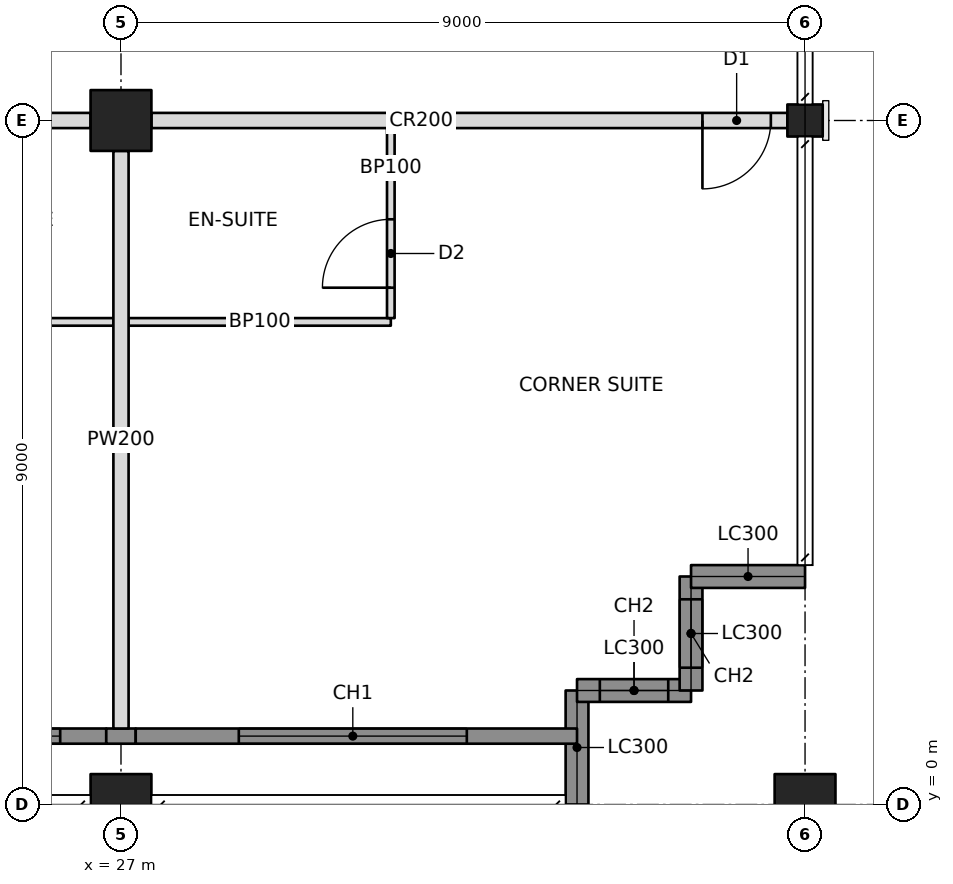
"""IFC4 building model, lengths in metres.
Left out: names, types, materials, properties, quantities, classifications, styles, units other than length and angle.
Written with IfcOpenShell. Run it as: python <this file> out.ifc"""

import sys

from ifc_helpers import new_model, si_unit, direction, frame, frame_2d, origin, origin_2d, place, context, subcontext, project, spatial, rectangle, hollow_rectangle, i_section, extrude, element, fill, save


model = new_model("IFC4")
c1 = context("Model", 3, precision=1e-05, world=origin(), true_north=direction((0.0, 1.0)))
c2 = subcontext(c1, "Body", "Model", "MODEL_VIEW")
j1 = project(units=[si_unit("LENGTHUNIT", "METRE"), si_unit("PLANEANGLEUNIT", "RADIAN")], contexts=[c1])
p1 = place(None, origin())
s1 = spatial("IfcSite", under=j1, at=p1, CompositionType="ELEMENT")
p2 = place(p1, origin())
s2 = spatial("IfcBuilding", under=s1, at=p2, CompositionType="ELEMENT")
p3 = place(p2, frame((0.0, 0.0, 244.6)))
s3 = spatial("IfcBuildingStorey", under=s2, at=p3, CompositionType="ELEMENT", Elevation=244.6)
p4 = place(p3, frame((27.0, 0.0, 0.0), z_axis=(0.0, 0.0, 1.0), x_axis=(1.0, 0.0, 0.0)))
e1 = element("IfcColumn", 1, at=p4, inside=s3, PredefinedType="COLUMN", context=c2, shape_type="SweptSolid", body=[
    extrude(hollow_rectangle(XDim=0.8, YDim=0.8, WallThickness=0.05, at=origin_2d()), origin(), (0.0, 0.0, 1.0), 3.6),
])
p5 = place(p3, frame((27.0, 9.0, 0.0), z_axis=(0.0, 0.0, 1.0), x_axis=(1.0, 0.0, 0.0)))
e2 = element("IfcColumn", 2, at=p5, inside=s3, PredefinedType="COLUMN", context=c2, shape_type="SweptSolid", body=[
    extrude(hollow_rectangle(XDim=0.8, YDim=0.8, WallThickness=0.04, at=origin_2d()), origin(), (0.0, 0.0, 1.0), 3.6),
])
p6 = place(p3, frame((36.0, 0.0, 0.0), z_axis=(0.0, 0.0, 1.0), x_axis=(1.0, 0.0, 0.0)))
e3 = element("IfcColumn", 3, at=p6, inside=s3, PredefinedType="COLUMN", context=c2, shape_type="SweptSolid", body=[
    extrude(hollow_rectangle(XDim=0.8, YDim=0.8, WallThickness=0.05, at=origin_2d()), origin(), (0.0, 0.0, 1.0), 3.6),
])
p7 = place(p3, frame((36.0, 9.0, 0.0), z_axis=(0.0, 0.0, 1.0), x_axis=(0.0, 1.0, 0.0)))
e4 = element("IfcColumn", 4, at=p7, inside=s3, PredefinedType="COLUMN", context=c2, shape_type="SweptSolid", body=[
    extrude(i_section(OverallWidth=0.422, OverallDepth=0.465, WebThickness=0.045, FlangeThickness=0.073, at=origin_2d()), origin(), (0.0, 0.0, 1.0), 3.6),
])
p8 = place(p3, frame((33.0, 0.0, 0.0), z_axis=(0.0, 0.0, 1.0), x_axis=(0.0, 1.0, 0.0)))
e5 = element("IfcWall", 5, at=p8, inside=s3, PredefinedType="SOLIDWALL", context=c2, shape_type="SweptSolid", body=[
    extrude(rectangle(XDim=1.5, YDim=0.3, at=frame_2d((0.75, 0.0))), origin(), (0.0, 0.0, 1.0), 2.62),
])
p9 = place(p3, frame((33.0, 1.5, 0.0), z_axis=(0.0, 0.0, 1.0), x_axis=(1.0, 0.0, 0.0)))
e6 = element("IfcWall", 6, at=p9, inside=s3, PredefinedType="SOLIDWALL", context=c2, shape_type="SweptSolid", body=[
    extrude(rectangle(XDim=1.5, YDim=0.3, at=frame_2d((0.75, 0.0))), origin(), (0.0, 0.0, 1.0), 3.4),
])
p10 = place(p9, frame((0.3, 0.0, 0.6)))
e7 = element("IfcOpeningElement", 7, at=p10, cuts=e6, PredefinedType="OPENING", context=c2, shape_type="SweptSolid", body=[
    extrude(rectangle(XDim=0.9, YDim=2.2, at=frame_2d((0.45, 1.1))), frame((0.0, 0.16, 0.0), z_axis=(0.0, -1.0, 0.0), x_axis=(1.0, 0.0, 0.0)), (0.0, 0.0, 1.0), 0.32),
])
p11 = place(p3, frame((34.5, 1.5, 0.0), z_axis=(0.0, 0.0, 1.0), x_axis=(0.0, 1.0, 0.0)))
e8 = element("IfcWall", 8, at=p11, inside=s3, PredefinedType="SOLIDWALL", context=c2, shape_type="SweptSolid", body=[
    extrude(rectangle(XDim=1.5, YDim=0.3, at=frame_2d((0.75, 0.0))), origin(), (0.0, 0.0, 1.0), 3.4),
])
p12 = place(p11, frame((0.3, 0.0, 0.6)))
e9 = element("IfcOpeningElement", 9, at=p12, cuts=e8, PredefinedType="OPENING", context=c2, shape_type="SweptSolid", body=[
    extrude(rectangle(XDim=0.9, YDim=2.2, at=frame_2d((0.45, 1.1))), frame((0.0, 0.16, 0.0), z_axis=(0.0, -1.0, 0.0), x_axis=(1.0, 0.0, 0.0)), (0.0, 0.0, 1.0), 0.32),
])
p13 = place(p3, frame((34.5, 3.0, 0.0), z_axis=(0.0, 0.0, 1.0), x_axis=(1.0, 0.0, 0.0)))
e10 = element("IfcWall", 10, at=p13, inside=s3, PredefinedType="SOLIDWALL", context=c2, shape_type="SweptSolid", body=[
    extrude(rectangle(XDim=1.5, YDim=0.3, at=frame_2d((0.75, 0.0))), origin(), (0.0, 0.0, 1.0), 2.62),
])
p14 = place(p3, frame((18.4, 9.0, 0.0), z_axis=(0.0, 0.0, 1.0), x_axis=(1.0, 0.0, 0.0)))
e11 = element("IfcWall", 11, at=p14, inside=s3, PredefinedType="PARTITIONING", context=c2, shape_type="SweptSolid", body=[
    extrude(rectangle(XDim=8.2, YDim=0.2, at=frame_2d((4.1, 0.0))), origin(), (0.0, 0.0, 1.0), 2.605),
])
p15 = place(p14, frame((0.15, 0.0, 0.0)))
e12 = element("IfcOpeningElement", 12, at=p15, cuts=e11, PredefinedType="OPENING", context=c2, shape_type="SweptSolid", body=[
    extrude(rectangle(XDim=0.9, YDim=2.1, at=frame_2d((0.45, 1.05))), frame((0.0, 0.11, 0.0), z_axis=(0.0, -1.0, 0.0), x_axis=(1.0, 0.0, 0.0)), (0.0, 0.0, 1.0), 0.22),
])
p16 = place(p3, frame((27.4, 9.0, 0.0), z_axis=(0.0, 0.0, 1.0), x_axis=(1.0, 0.0, 0.0)))
e13 = element("IfcWall", 13, at=p16, inside=s3, PredefinedType="PARTITIONING", context=c2, shape_type="SweptSolid", body=[
    extrude(rectangle(XDim=8.368, YDim=0.2, at=frame_2d((4.184, 0.0))), origin(), (0.0, 0.0, 1.0), 2.605),
])
p17 = place(p16, frame((7.25, 0.0, 0.0)))
e14 = element("IfcOpeningElement", 14, at=p17, cuts=e13, PredefinedType="OPENING", context=c2, shape_type="SweptSolid", body=[
    extrude(rectangle(XDim=0.9, YDim=2.1, at=frame_2d((0.45, 1.05))), frame((0.0, 0.11, 0.0), z_axis=(0.0, -1.0, 0.0), x_axis=(1.0, 0.0, 0.0)), (0.0, 0.0, 1.0), 0.22),
])
p18 = place(p3, frame((27.0, 8.6, 0.0), z_axis=(0.0, 0.0, 1.0), x_axis=(0.0, -1.0, 0.0)))
e15 = element("IfcWall", 15, at=p18, inside=s3, PredefinedType="PARTITIONING", context=c2, shape_type="SweptSolid", body=[
    extrude(rectangle(XDim=7.6, YDim=0.2, at=frame_2d((3.8, 0.0))), origin(), (0.0, 0.0, 1.0), 2.605),
])
for number, where, z_axis, x_axis in (
    (16, (23.45, 6.35, 0.0), (0.0, 0.0, 1.0), (1.0, 0.0, 0.0)),
    (17, (27.1, 6.35, 0.0), (0.0, 0.0, 1.0), (1.0, 0.0, 0.0)),
):
    element("IfcWall", number, at=place(p3, frame(where, z_axis=z_axis, x_axis=x_axis)), inside=s3, PredefinedType="PARTITIONING", context=c2, shape_type="SweptSolid", body=[
        extrude(rectangle(XDim=3.45, YDim=0.1, at=frame_2d((1.725, 0.0))), origin(), (0.0, 0.0, 1.0), 2.604),
    ])
p19 = place(p3, frame((30.55, 8.9, 0.0), z_axis=(0.0, 0.0, 1.0), x_axis=(0.0, -1.0, 0.0)))
e18 = element("IfcWall", 18, at=p19, inside=s3, PredefinedType="PARTITIONING", context=c2, shape_type="SweptSolid", body=[
    extrude(rectangle(XDim=2.5, YDim=0.1, at=frame_2d((1.25, 0.0))), origin(), (0.0, 0.0, 1.0), 2.604),
])
p20 = place(p19, frame((1.2, 0.0, 0.0)))
e19 = element("IfcOpeningElement", 19, at=p20, cuts=e18, PredefinedType="OPENING", context=c2, shape_type="SweptSolid", body=[
    extrude(rectangle(XDim=0.9, YDim=2.1, at=frame_2d((0.45, 1.05))), frame((0.0, 0.06, 0.0), z_axis=(0.0, -1.0, 0.0), x_axis=(1.0, 0.0, 0.0)), (0.0, 0.0, 1.0), 0.12),
])
p21 = place(p3, frame((18.194, 0.9, 0.0), z_axis=(0.0, 0.0, 1.0), x_axis=(1.0, 0.0, 0.0)))
e20 = element("IfcWall", 20, at=p21, inside=s3, PredefinedType="SOLIDWALL", context=c2, shape_type="SweptSolid", body=[
    extrude(rectangle(XDim=8.612, YDim=0.2, at=frame_2d((4.306, 0.0))), origin(), (0.0, 0.0, 1.0), 3.4),
])
p22 = place(p21, frame((0.606, 0.0, 0.6)))
e21 = element("IfcOpeningElement", 21, at=p22, cuts=e20, PredefinedType="OPENING", context=c2, shape_type="SweptSolid", body=[
    extrude(rectangle(XDim=3.0, YDim=2.2, at=frame_2d((1.5, 1.1))), frame((0.0, 0.11, 0.0), z_axis=(0.0, -1.0, 0.0), x_axis=(1.0, 0.0, 0.0)), (0.0, 0.0, 1.0), 0.22),
])
p23 = place(p21, frame((5.006, 0.0, 0.6)))
e22 = element("IfcOpeningElement", 22, at=p23, cuts=e20, PredefinedType="OPENING", context=c2, shape_type="SweptSolid", body=[
    extrude(rectangle(XDim=3.0, YDim=2.2, at=frame_2d((1.5, 1.1))), frame((0.0, 0.11, 0.0), z_axis=(0.0, -1.0, 0.0), x_axis=(1.0, 0.0, 0.0)), (0.0, 0.0, 1.0), 0.22),
])
p24 = place(p3, frame((26.806, 0.9, 0.0), z_axis=(0.0, 0.0, 1.0), x_axis=(1.0, 0.0, 0.0)))
e23 = element("IfcWall", 23, at=p24, inside=s3, PredefinedType="SOLIDWALL", context=c2, shape_type="SweptSolid", body=[
    extrude(rectangle(XDim=0.388, YDim=0.2, at=frame_2d((0.194, 0.0))), origin(), (0.0, 0.0, 1.0), 2.604),
])
p25 = place(p3, frame((27.194, 0.9, 0.0), z_axis=(0.0, 0.0, 1.0), x_axis=(1.0, 0.0, 0.0)))
e24 = element("IfcWall", 24, at=p25, inside=s3, PredefinedType="SOLIDWALL", context=c2, shape_type="SweptSolid", body=[
    extrude(rectangle(XDim=5.806, YDim=0.2, at=frame_2d((2.903, 0.0))), origin(), (0.0, 0.0, 1.0), 3.4),
])
p26 = place(p25, frame((1.356, 0.0, 0.6)))
e25 = element("IfcOpeningElement", 25, at=p26, cuts=e24, PredefinedType="OPENING", context=c2, shape_type="SweptSolid", body=[
    extrude(rectangle(XDim=3.0, YDim=2.2, at=frame_2d((1.5, 1.1))), frame((0.0, 0.11, 0.0), z_axis=(0.0, -1.0, 0.0), x_axis=(1.0, 0.0, 0.0)), (0.0, 0.0, 1.0), 0.22),
])
p27 = place(p10, origin())
e26 = element("IfcWindow", 26, at=p27, inside=s3, PartitioningType="SINGLE_PANEL", PredefinedType="WINDOW", context=c2, shape_type="SweptSolid", body=[
    extrude(rectangle(XDim=0.9, YDim=2.2, at=frame_2d((0.45, 1.1))), frame((0.0, 0.03, 0.0), z_axis=(0.0, -1.0, 0.0), x_axis=(1.0, 0.0, 0.0)), (0.0, 0.0, 1.0), 0.06),
])
fill(e7, e26)
p28 = place(p12, origin())
e27 = element("IfcWindow", 27, at=p28, inside=s3, PartitioningType="SINGLE_PANEL", PredefinedType="WINDOW", context=c2, shape_type="SweptSolid", body=[
    extrude(rectangle(XDim=0.9, YDim=2.2, at=frame_2d((0.45, 1.1))), frame((0.0, 0.03, 0.0), z_axis=(0.0, -1.0, 0.0), x_axis=(1.0, 0.0, 0.0)), (0.0, 0.0, 1.0), 0.06),
])
fill(e9, e27)
p29 = place(p23, origin())
e28 = element("IfcWindow", 28, at=p29, inside=s3, PartitioningType="TRIPLE_PANEL_VERTICAL", PredefinedType="WINDOW", context=c2, shape_type="SweptSolid", body=[
    extrude(rectangle(XDim=3.0, YDim=2.2, at=frame_2d((1.5, 1.1))), frame((0.0, 0.03, 0.0), z_axis=(0.0, -1.0, 0.0), x_axis=(1.0, 0.0, 0.0)), (0.0, 0.0, 1.0), 0.06),
])
fill(e22, e28)
p30 = place(p26, origin())
e29 = element("IfcWindow", 29, at=p30, inside=s3, PartitioningType="TRIPLE_PANEL_VERTICAL", PredefinedType="WINDOW", context=c2, shape_type="SweptSolid", body=[
    extrude(rectangle(XDim=3.0, YDim=2.2, at=frame_2d((1.5, 1.1))), frame((0.0, 0.03, 0.0), z_axis=(0.0, -1.0, 0.0), x_axis=(1.0, 0.0, 0.0)), (0.0, 0.0, 1.0), 0.06),
])
fill(e25, e29)
p31 = place(p20, frame((0.9, 0.0, 0.0), z_axis=(0.0, 0.0, 1.0), x_axis=(-1.0, 0.0, 0.0)))
e30 = element("IfcDoor", 30, at=p31, inside=s3, OperationType="SINGLE_SWING_LEFT", PredefinedType="DOOR", context=c2, shape_type="SweptSolid", body=[
    extrude(rectangle(XDim=0.9, YDim=2.1, at=frame_2d((0.45, 1.05))), frame((0.0, 0.025, 0.0), z_axis=(0.0, -1.0, 0.0), x_axis=(1.0, 0.0, 0.0)), (0.0, 0.0, 1.0), 0.05),
])
fill(e19, e30)
p32 = place(p17, frame((0.9, 0.0, 0.0), z_axis=(0.0, 0.0, 1.0), x_axis=(-1.0, 0.0, 0.0)))
e31 = element("IfcDoor", 31, at=p32, inside=s3, OperationType="SINGLE_SWING_RIGHT", PredefinedType="DOOR", context=c2, shape_type="SweptSolid", body=[
    extrude(rectangle(XDim=0.9, YDim=2.1, at=frame_2d((0.45, 1.05))), frame((0.0, 0.025, 0.0), z_axis=(0.0, -1.0, 0.0), x_axis=(1.0, 0.0, 0.0)), (0.0, 0.0, 1.0), 0.05),
])
fill(e14, e31)
save(model, sys.argv[1])
